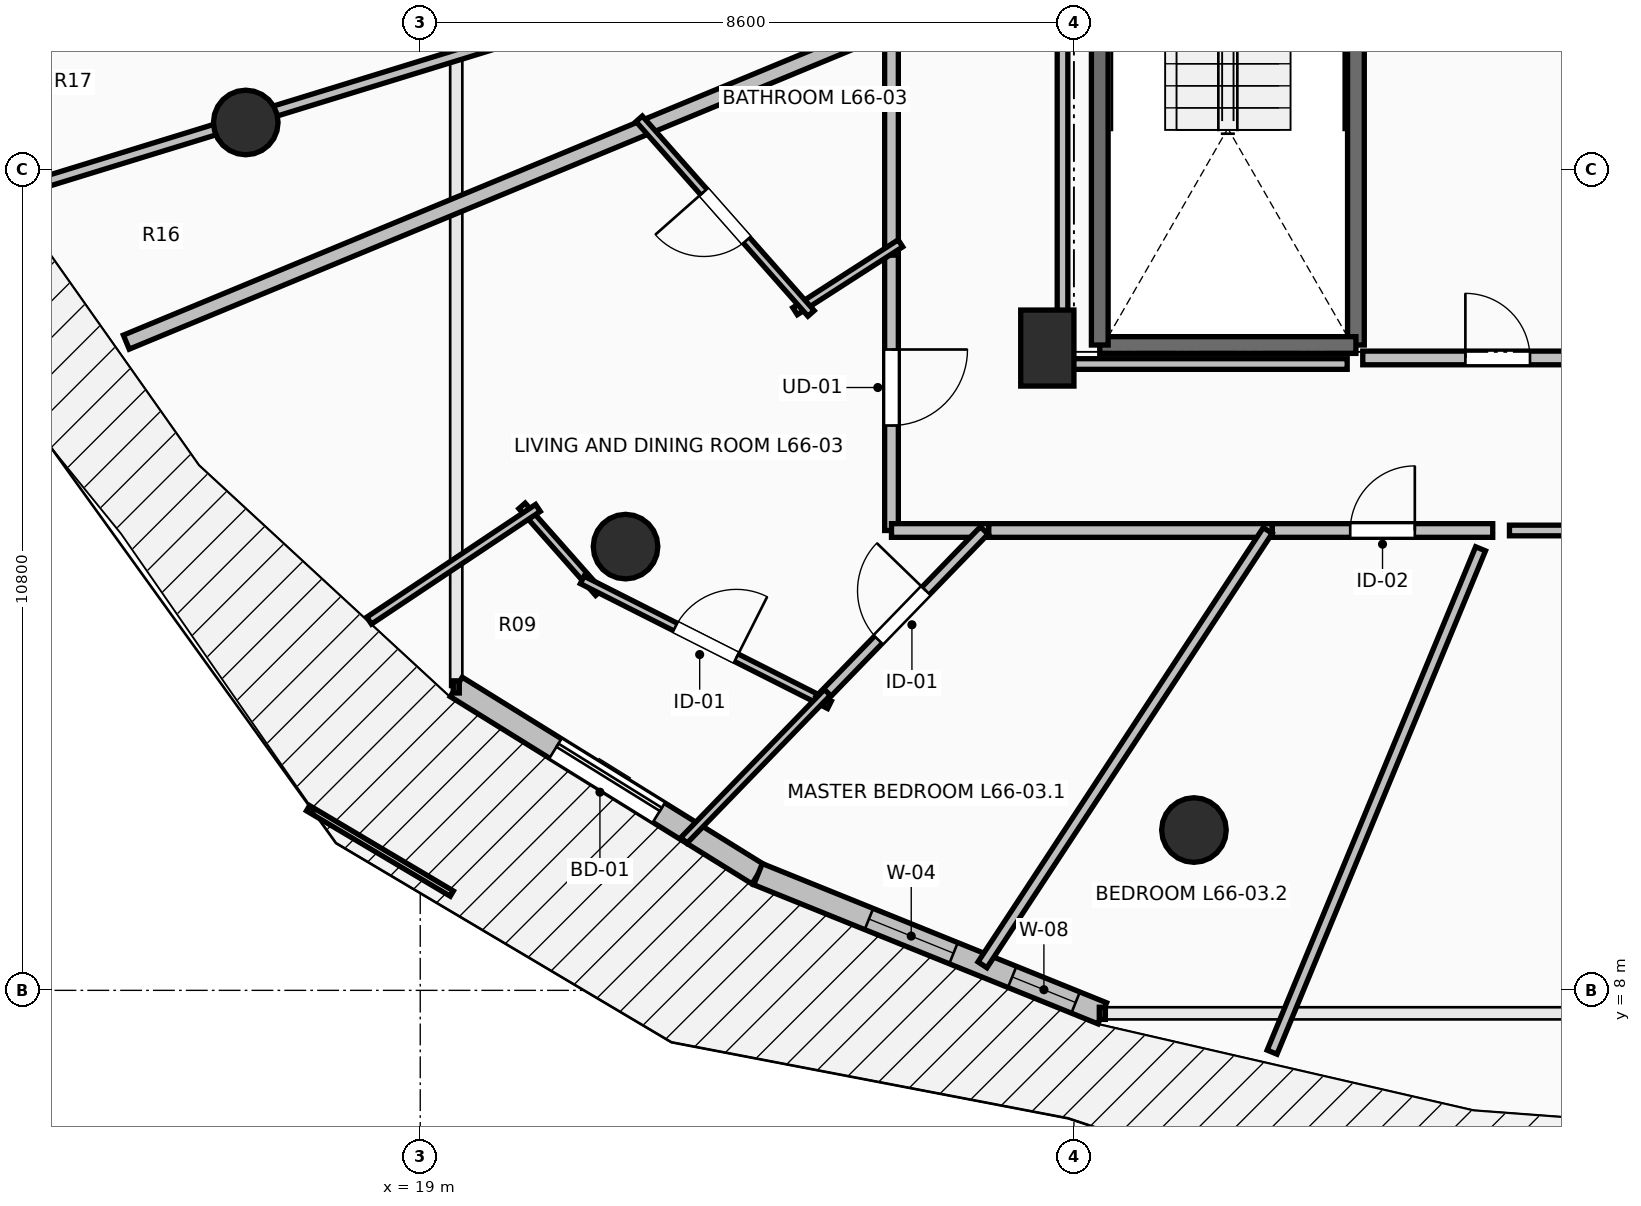
"""IFC4 building model, lengths in metres.
Left out: names, types, materials, properties, quantities, classifications, styles, units other than length and angle.
Written with IfcOpenShell. Run it as: python <this file> out.ifc"""

import sys

from ifc_helpers import new_model, si_unit, direction, frame, frame_2d, origin, origin_2d, place, context, subcontext, project, spatial, rectangle, circle, extrude, element, fill, save


model = new_model("IFC4")
c1 = context("Model", 3, precision=1e-05, world=origin(), true_north=direction((0.0, 1.0)))
c2 = subcontext(c1, "Body", "Model", "MODEL_VIEW")
j1 = project(units=[si_unit("LENGTHUNIT", "METRE"), si_unit("PLANEANGLEUNIT", "RADIAN")], contexts=[c1])
p1 = place(None, origin())
s1 = spatial("IfcSite", under=j1, at=p1, CompositionType="ELEMENT")
p2 = place(p1, origin())
s2 = spatial("IfcBuilding", under=s1, at=p2, CompositionType="ELEMENT")
p3 = place(p2, frame((0.0, 0.0, 244.9)))
s3 = spatial("IfcBuildingStorey", under=s2, at=p3, CompositionType="ELEMENT", Elevation=244.9)
for number, where, z_axis, x_axis in (
    (1, (16.705, 19.418, 0.0), (0.0, 0.0, 1.0), (-0.924, -0.383, 0.0)),
    (2, (21.701, 13.838, 0.0), (0.0, 0.0, 1.0), (-0.707, -0.707, 0.0)),
    (3, (29.179, 10.109, 0.0), (0.0, 0.0, 1.0), (-0.383, -0.924, 0.0)),
):
    element("IfcColumn", number, at=place(p3, frame(where, z_axis=z_axis, x_axis=x_axis)), inside=s3, PredefinedType="COLUMN", context=c2, shape_type="SweptSolid", body=[
        extrude(circle(Radius=0.425, at=origin_2d()), origin(), (0.0, 0.0, 1.0), 3.55),
    ])
p4 = place(p3, frame((27.25, 16.45, 0.0), z_axis=(0.0, 0.0, 1.0), x_axis=(1.0, 0.0, 0.0)))
e4 = element("IfcColumn", 4, at=p4, inside=s3, PredefinedType="PILASTER", context=c2, shape_type="SweptSolid", body=[
    extrude(rectangle(XDim=0.7, YDim=1.0, at=origin_2d()), origin(), (0.0, 0.0, 1.0), 3.55),
])
p5 = place(p3, frame((19.474, 11.992, 0.0), z_axis=(0.0, 0.0, 1.0), x_axis=(0.849702323036, -0.527262707032, 0.0)))
e5 = element("IfcWall", 5, at=p5, inside=s3, PredefinedType="STANDARD", context=c2, shape_type="SweptSolid", body=[
    extrude(rectangle(XDim=4.672, YDim=0.3, at=frame_2d((2.336, 0.0))), origin(), (0.0, 0.0, 1.0), 3.29),
])
p6 = place(p5, frame((1.536, 0.0, 0.0)))
e6 = element("IfcOpeningElement", 6, at=p6, cuts=e5, PredefinedType="OPENING", context=c2, shape_type="SweptSolid", body=[
    extrude(rectangle(XDim=1.6, YDim=2.3, at=frame_2d((0.8, 1.15))), frame((0.0, 0.165, 0.0), z_axis=(0.0, -1.0, 0.0), x_axis=(1.0, 0.0, 0.0)), (0.0, 0.0, 1.0), 0.33),
])
p7 = place(p3, frame((23.444, 9.529, 0.0), z_axis=(0.0, 0.0, 1.0), x_axis=(0.927147375511, -0.374696869594, 0.0)))
e7 = element("IfcWall", 7, at=p7, inside=s3, PredefinedType="STANDARD", context=c2, shape_type="SweptSolid", body=[
    extrude(rectangle(XDim=4.885, YDim=0.3, at=frame_2d((2.443, 0.0))), origin(), (0.0, 0.0, 1.0), 3.29),
])
p8 = place(p7, frame((1.574, 0.0, 0.85)))
e8 = element("IfcOpeningElement", 8, at=p8, cuts=e7, PredefinedType="OPENING", context=c2, shape_type="SweptSolid", body=[
    extrude(rectangle(XDim=1.2, YDim=1.95, at=frame_2d((0.6, 0.975))), frame((0.0, 0.165, 0.0), z_axis=(0.0, -1.0, 0.0), x_axis=(1.0, 0.0, 0.0)), (0.0, 0.0, 1.0), 0.33),
])
p9 = place(p7, frame((3.606, 0.0, 0.85)))
e9 = element("IfcOpeningElement", 9, at=p9, cuts=e7, PredefinedType="OPENING", context=c2, shape_type="SweptSolid", body=[
    extrude(rectangle(XDim=0.9, YDim=1.8, at=frame_2d((0.45, 0.9))), frame((0.0, 0.165, 0.0), z_axis=(0.0, -1.0, 0.0), x_axis=(1.0, 0.0, 0.0)), (0.0, 0.0, 1.0), 0.33),
])
p10 = place(p3, frame((31.31, 23.91, 0.0), z_axis=(0.0, 0.0, 1.0), x_axis=(0.0, -1.0, 0.0)))
e10 = element("IfcWall", 10, at=p10, inside=s3, PredefinedType="SOLIDWALL", context=c2, shape_type="SweptSolid", body=[
    extrude(rectangle(XDim=7.42, YDim=0.22, at=frame_2d((3.71, 0.0))), origin(), (0.0, 0.0, 1.0), 3.29),
])
p11 = place(p3, frame((31.31, 16.49, 0.0), z_axis=(0.0, 0.0, 1.0), x_axis=(-1.0, 0.0, 0.0)))
e11 = element("IfcWall", 11, at=p11, inside=s3, PredefinedType="SOLIDWALL", context=c2, shape_type="SweptSolid", body=[
    extrude(rectangle(XDim=3.37, YDim=0.22, at=frame_2d((1.685, 0.0))), origin(), (0.0, 0.0, 1.0), 3.29),
])
p12 = place(p3, frame((27.94, 16.49, 0.0), z_axis=(0.0, 0.0, 1.0), x_axis=(0.0, 1.0, 0.0)))
e12 = element("IfcWall", 12, at=p12, inside=s3, PredefinedType="SOLIDWALL", context=c2, shape_type="SweptSolid", body=[
    extrude(rectangle(XDim=7.42, YDim=0.22, at=frame_2d((3.71, 0.0))), origin(), (0.0, 0.0, 1.0), 3.29),
])
p13 = place(p3, frame((31.4, 16.32, 0.0), z_axis=(0.0, 0.0, 1.0), x_axis=(1.0, 0.0, 0.0)))
e13 = element("IfcWall", 13, at=p13, inside=s3, PredefinedType="PARTITIONING", context=c2, shape_type="SweptSolid", body=[
    extrude(rectangle(XDim=3.55, YDim=0.18, at=frame_2d((1.775, 0.0))), origin(), (0.0, 0.0, 1.0), 3.29),
])
p14 = place(p13, frame((1.35, 0.0, 0.0)))
e14 = element("IfcOpeningElement", 14, at=p14, cuts=e13, PredefinedType="OPENING", context=c2, shape_type="SweptSolid", body=[
    extrude(rectangle(XDim=0.85, YDim=2.1, at=frame_2d((0.425, 1.05))), frame((0.0, 0.105, 0.0), z_axis=(0.0, -1.0, 0.0), x_axis=(1.0, 0.0, 0.0)), (0.0, 0.0, 1.0), 0.21),
])
p15 = place(p3, frame((25.2, 17.812, 0.0), z_axis=(0.0, 0.0, 1.0), x_axis=(0.0, -1.0, 0.0)))
e15 = element("IfcWall", 15, at=p15, inside=s3, PredefinedType="PARTITIONING", context=c2, shape_type="SweptSolid", body=[
    extrude(rectangle(XDim=3.762, YDim=0.18, at=frame_2d((1.881, 0.0))), origin(), (0.0, 0.0, 1.0), 2.482),
])
p16 = place(p15, frame((1.381, 0.0, 0.0)))
e16 = element("IfcOpeningElement", 16, at=p16, cuts=e15, PredefinedType="OPENING", context=c2, shape_type="SweptSolid", body=[
    extrude(rectangle(XDim=1.0, YDim=2.15, at=frame_2d((0.5, 1.075))), frame((0.0, 0.105, 0.0), z_axis=(0.0, -1.0, 0.0), x_axis=(1.0, 0.0, 0.0)), (0.0, 0.0, 1.0), 0.21),
])
p17 = place(p3, frame((25.2, 14.05, 0.0), z_axis=(0.0, 0.0, 1.0), x_axis=(1.0, 0.0, 0.0)))
e17 = element("IfcWall", 17, at=p17, inside=s3, PredefinedType="PARTITIONING", context=c2, shape_type="SweptSolid", body=[
    extrude(rectangle(XDim=1.28, YDim=0.18, at=frame_2d((0.64, 0.0))), origin(), (0.0, 0.0, 1.0), 2.972),
])
p18 = place(p3, frame((25.2, 20.773, 0.0), z_axis=(0.0, 0.0, 1.0), x_axis=(0.0, -1.0, 0.0)))
e18 = element("IfcWall", 18, at=p18, inside=s3, PredefinedType="PARTITIONING", context=c2, shape_type="SweptSolid", body=[
    extrude(rectangle(XDim=3.101, YDim=0.18, at=frame_2d((1.55, 0.0))), origin(), (0.0, 0.0, 1.0), 3.29),
])
p19 = place(p3, frame((26.48, 14.05, 0.0), z_axis=(0.0, 0.0, 1.0), x_axis=(1.0, 0.0, 0.0)))
e19 = element("IfcWall", 19, at=p19, inside=s3, PredefinedType="PARTITIONING", context=c2, shape_type="SweptSolid", body=[
    extrude(rectangle(XDim=3.73, YDim=0.18, at=frame_2d((1.865, 0.0))), origin(), (0.0, 0.0, 1.0), 2.482),
])
p20 = place(p3, frame((30.21, 14.05, 0.0), z_axis=(0.0, 0.0, 1.0), x_axis=(1.0, 0.0, 0.0)))
e20 = element("IfcWall", 20, at=p20, inside=s3, PredefinedType="PARTITIONING", context=c2, shape_type="SweptSolid", body=[
    extrude(rectangle(XDim=2.9, YDim=0.18, at=frame_2d((1.45, 0.0))), origin(), (0.0, 0.0, 1.0), 3.29),
])
p21 = place(p20, frame((1.025, 0.0, 0.0)))
e21 = element("IfcOpeningElement", 21, at=p21, cuts=e20, PredefinedType="OPENING", context=c2, shape_type="SweptSolid", body=[
    extrude(rectangle(XDim=0.85, YDim=2.1, at=frame_2d((0.425, 1.05))), frame((0.0, 0.105, 0.0), z_axis=(0.0, -1.0, 0.0), x_axis=(1.0, 0.0, 0.0)), (0.0, 0.0, 1.0), 0.21),
])
p22 = place(p3, frame((13.747, 18.539, 0.0), z_axis=(0.0, 0.0, 1.0), x_axis=(0.955802794564, 0.294008533725, 0.0)))
e22 = element("IfcWall", 22, at=p22, inside=s3, PredefinedType="PARTITIONING", context=c2, shape_type="SweptSolid", body=[
    extrude(rectangle(XDim=11.982, YDim=0.14, at=frame_2d((5.991, 0.0))), origin(), (0.0, 0.0, 1.0), 2.482),
])
p23 = place(p3, frame((15.133, 16.528, 0.0), z_axis=(0.0, 0.0, 1.0), x_axis=(0.923877013663, 0.382689513347, 0.0)))
e23 = element("IfcWall", 23, at=p23, inside=s3, PredefinedType="PARTITIONING", context=c2, shape_type="SweptSolid", body=[
    extrude(rectangle(XDim=10.896, YDim=0.2, at=frame_2d((5.448, 0.0))), origin(), (0.0, 0.0, 1.0), 2.482),
])
p24 = place(p3, frame((25.318, 17.828, 0.0), z_axis=(0.0, 0.0, 1.0), x_axis=(-0.840783734709, -0.541371140207, 0.0)))
e24 = element("IfcWall", 24, at=p24, inside=s3, PredefinedType="PARTITIONING", context=c2, shape_type="SweptSolid", body=[
    extrude(rectangle(XDim=1.649, YDim=0.11, at=frame_2d((0.824, 0.0))), origin(), (0.0, 0.0, 1.0), 2.482),
])
p25 = place(p3, frame((24.142, 16.906, 0.0), z_axis=(0.0, 0.0, 1.0), x_axis=(-0.662044708061, 0.749464345068, 0.0)))
e25 = element("IfcWall", 25, at=p25, inside=s3, PredefinedType="PARTITIONING", context=c2, shape_type="SweptSolid", body=[
    extrude(rectangle(XDim=3.416, YDim=0.11, at=frame_2d((1.708, 0.0))), origin(), (0.0, 0.0, 1.0), 2.482),
])
p26 = place(p25, frame((1.283, 0.0, 0.0)))
e26 = element("IfcOpeningElement", 26, at=p26, cuts=e25, PredefinedType="OPENING", context=c2, shape_type="SweptSolid", body=[
    extrude(rectangle(XDim=0.85, YDim=2.1, at=frame_2d((0.425, 1.05))), frame((0.0, 0.07, 0.0), z_axis=(0.0, -1.0, 0.0), x_axis=(1.0, 0.0, 0.0)), (0.0, 0.0, 1.0), 0.14),
])
p27 = place(p3, frame((20.339, 14.374, 0.0), z_axis=(0.0, 0.0, 1.0), x_axis=(0.662352602393, -0.749192251764, 0.0)))
e27 = element("IfcWall", 27, at=p27, inside=s3, PredefinedType="PARTITIONING", context=c2, shape_type="SweptSolid", body=[
    extrude(rectangle(XDim=1.524, YDim=0.11, at=frame_2d((0.762, 0.0))), origin(), (0.0, 0.0, 1.0), 3.29),
])
p28 = place(p3, frame((21.131, 13.4, 0.0), z_axis=(0.0, 0.0, 1.0), x_axis=(0.892570631547, -0.450907604394, 0.0)))
e28 = element("IfcWall", 28, at=p28, inside=s3, PredefinedType="PARTITIONING", context=c2, shape_type="SweptSolid", body=[
    extrude(rectangle(XDim=3.645, YDim=0.11, at=frame_2d((1.822, 0.0))), origin(), (0.0, 0.0, 1.0), 3.29),
])
p29 = place(p28, frame((1.372, 0.0, 0.0)))
e29 = element("IfcOpeningElement", 29, at=p29, cuts=e28, PredefinedType="OPENING", context=c2, shape_type="SweptSolid", body=[
    extrude(rectangle(XDim=0.9, YDim=2.1, at=frame_2d((0.45, 1.05))), frame((0.0, 0.07, 0.0), z_axis=(0.0, -1.0, 0.0), x_axis=(1.0, 0.0, 0.0)), (0.0, 0.0, 1.0), 0.14),
])
p30 = place(p3, frame((18.328, 12.864, 0.0), z_axis=(0.0, 0.0, 1.0), x_axis=(0.831712526046, 0.555206514748, 0.0)))
e30 = element("IfcWall", 30, at=p30, inside=s3, PredefinedType="PARTITIONING", context=c2, shape_type="SweptSolid", body=[
    extrude(rectangle(XDim=2.67, YDim=0.11, at=frame_2d((1.335, 0.0))), origin(), (0.0, 0.0, 1.0), 3.29),
])
p31 = place(p3, frame((24.259, 11.82, 0.0), z_axis=(0.0, 0.0, 1.0), x_axis=(0.695894072482, 0.718144442215, 0.0)))
e31 = element("IfcWall", 31, at=p31, inside=s3, PredefinedType="PARTITIONING", context=c2, shape_type="SweptSolid", body=[
    extrude(rectangle(XDim=3.105, YDim=0.14, at=frame_2d((1.553, 0.0))), origin(), (0.0, 0.0, 1.0), 2.874),
])
p32 = place(p31, frame((1.103, 0.0, 0.0)))
e32 = element("IfcOpeningElement", 32, at=p32, cuts=e31, PredefinedType="OPENING", context=c2, shape_type="SweptSolid", body=[
    extrude(rectangle(XDim=0.9, YDim=2.1, at=frame_2d((0.45, 1.05))), frame((0.0, 0.085, 0.0), z_axis=(0.0, -1.0, 0.0), x_axis=(1.0, 0.0, 0.0)), (0.0, 0.0, 1.0), 0.17),
])
p33 = place(p3, frame((22.469, 9.973, 0.0), z_axis=(0.0, 0.0, 1.0), x_axis=(0.695944713466, 0.718095366786, 0.0)))
e33 = element("IfcWall", 33, at=p33, inside=s3, PredefinedType="PARTITIONING", context=c2, shape_type="SweptSolid", body=[
    extrude(rectangle(XDim=2.711, YDim=0.11, at=frame_2d((1.356, 0.0))), origin(), (0.0, 0.0, 1.0), 3.29),
])
p34 = place(p3, frame((26.397, 8.336, 0.0), z_axis=(0.0, 0.0, 1.0), x_axis=(0.548967647923, 0.835843598728, 0.0)))
e34 = element("IfcWall", 34, at=p34, inside=s3, PredefinedType="PARTITIONING", context=c2, shape_type="SweptSolid", body=[
    extrude(rectangle(XDim=6.836, YDim=0.14, at=frame_2d((3.418, 0.0))), origin(), (0.0, 0.0, 1.0), 2.482),
])
p35 = place(p3, frame((33.33, 14.05, 0.0), z_axis=(0.0, 0.0, 1.0), x_axis=(1.0, 0.0, 0.0)))
e35 = element("IfcWall", 35, at=p35, inside=s3, PredefinedType="PARTITIONING", context=c2, shape_type="SweptSolid", body=[
    extrude(rectangle(XDim=3.22, YDim=0.14, at=frame_2d((1.61, 0.0))), origin(), (0.0, 0.0, 1.0), 3.29),
])
p36 = place(p3, frame((27.45, 23.754, 0.0), z_axis=(0.0, 0.0, 1.0), x_axis=(0.0, -1.0, 0.0)))
e36 = element("IfcWall", 36, at=p36, inside=s3, PredefinedType="PARTITIONING", context=c2, shape_type="SweptSolid", body=[
    extrude(rectangle(XDim=7.514, YDim=0.14, at=frame_2d((3.757, 0.0))), origin(), (0.0, 0.0, 1.0), 2.482),
])
p37 = place(p3, frame((27.45, 16.24, 0.0), z_axis=(0.0, 0.0, 1.0), x_axis=(1.0, 0.0, 0.0)))
e37 = element("IfcWall", 37, at=p37, inside=s3, PredefinedType="PARTITIONING", context=c2, shape_type="SweptSolid", body=[
    extrude(rectangle(XDim=3.745, YDim=0.14, at=frame_2d((1.873, 0.0))), origin(), (0.0, 0.0, 1.0), 2.482),
])
p38 = place(p3, frame((30.207, 7.187, 0.0), z_axis=(0.0, 0.0, 1.0), x_axis=(0.382679691634, 0.923881081964, 0.0)))
e38 = element("IfcWall", 38, at=p38, inside=s3, PredefinedType="PARTITIONING", context=c2, shape_type="SweptSolid", body=[
    extrude(rectangle(XDim=7.168, YDim=0.14, at=frame_2d((3.584, 0.0))), origin(), (0.0, 0.0, 1.0), 2.874),
])
p39 = place(p6, origin())
e39 = element("IfcDoor", 39, at=p39, inside=s3, OperationType="SLIDING_TO_LEFT", PredefinedType="DOOR", context=c2, shape_type="SweptSolid", body=[
    extrude(rectangle(XDim=1.6, YDim=2.3, at=frame_2d((0.8, 1.15))), frame((0.0, 0.025, 0.0), z_axis=(0.0, -1.0, 0.0), x_axis=(1.0, 0.0, 0.0)), (0.0, 0.0, 1.0), 0.05),
])
fill(e6, e39)
p40 = place(p8, origin())
e40 = element("IfcWindow", 40, at=p40, inside=s3, PartitioningType="SINGLE_PANEL", PredefinedType="WINDOW", context=c2, shape_type="SweptSolid", body=[
    extrude(rectangle(XDim=1.2, YDim=1.95, at=frame_2d((0.6, 0.975))), frame((0.0, 0.03, 0.0), z_axis=(0.0, -1.0, 0.0), x_axis=(1.0, 0.0, 0.0)), (0.0, 0.0, 1.0), 0.06),
])
fill(e8, e40)
p41 = place(p9, origin())
e41 = element("IfcWindow", 41, at=p41, inside=s3, PartitioningType="SINGLE_PANEL", PredefinedType="WINDOW", context=c2, shape_type="SweptSolid", body=[
    extrude(rectangle(XDim=0.9, YDim=1.8, at=frame_2d((0.45, 0.9))), frame((0.0, 0.03, 0.0), z_axis=(0.0, -1.0, 0.0), x_axis=(1.0, 0.0, 0.0)), (0.0, 0.0, 1.0), 0.06),
])
fill(e9, e41)
p42 = place(p14, origin())
e42 = element("IfcDoor", 42, at=p42, inside=s3, OperationType="SINGLE_SWING_LEFT", PredefinedType="DOOR", context=c2, shape_type="SweptSolid", body=[
    extrude(rectangle(XDim=0.85, YDim=2.1, at=frame_2d((0.425, 1.05))), frame((0.0, 0.025, 0.0), z_axis=(0.0, -1.0, 0.0), x_axis=(1.0, 0.0, 0.0)), (0.0, 0.0, 1.0), 0.05),
])
fill(e14, e42)
p43 = place(p16, origin())
e43 = element("IfcDoor", 43, at=p43, inside=s3, OperationType="SINGLE_SWING_LEFT", PredefinedType="DOOR", context=c2, shape_type="SweptSolid", body=[
    extrude(rectangle(XDim=1.0, YDim=2.15, at=frame_2d((0.5, 1.075))), frame((0.0, 0.025, 0.0), z_axis=(0.0, -1.0, 0.0), x_axis=(1.0, 0.0, 0.0)), (0.0, 0.0, 1.0), 0.05),
])
fill(e16, e43)
p44 = place(p26, origin())
e44 = element("IfcDoor", 44, at=p44, inside=s3, OperationType="SINGLE_SWING_RIGHT", PredefinedType="DOOR", context=c2, shape_type="SweptSolid", body=[
    extrude(rectangle(XDim=0.85, YDim=2.1, at=frame_2d((0.425, 1.05))), frame((0.0, 0.025, 0.0), z_axis=(0.0, -1.0, 0.0), x_axis=(1.0, 0.0, 0.0)), (0.0, 0.0, 1.0), 0.05),
])
fill(e26, e44)
p45 = place(p29, origin())
e45 = element("IfcDoor", 45, at=p45, inside=s3, OperationType="SINGLE_SWING_RIGHT", PredefinedType="DOOR", context=c2, shape_type="SweptSolid", body=[
    extrude(rectangle(XDim=0.9, YDim=2.1, at=frame_2d((0.45, 1.05))), frame((0.0, 0.025, 0.0), z_axis=(0.0, -1.0, 0.0), x_axis=(1.0, 0.0, 0.0)), (0.0, 0.0, 1.0), 0.05),
])
fill(e29, e45)
p46 = place(p32, origin())
e46 = element("IfcDoor", 46, at=p46, inside=s3, OperationType="SINGLE_SWING_RIGHT", PredefinedType="DOOR", context=c2, shape_type="SweptSolid", body=[
    extrude(rectangle(XDim=0.9, YDim=2.1, at=frame_2d((0.45, 1.05))), frame((0.0, 0.025, 0.0), z_axis=(0.0, -1.0, 0.0), x_axis=(1.0, 0.0, 0.0)), (0.0, 0.0, 1.0), 0.05),
])
fill(e32, e46)
p47 = place(p21, origin())
e47 = element("IfcDoor", 47, at=p47, inside=s3, OperationType="SINGLE_SWING_RIGHT", PredefinedType="DOOR", context=c2, shape_type="SweptSolid", body=[
    extrude(rectangle(XDim=0.85, YDim=2.1, at=frame_2d((0.425, 1.05))), frame((0.0, 0.025, 0.0), z_axis=(0.0, -1.0, 0.0), x_axis=(1.0, 0.0, 0.0)), (0.0, 0.0, 1.0), 0.05),
])
fill(e21, e47)
save(model, sys.argv[1])
